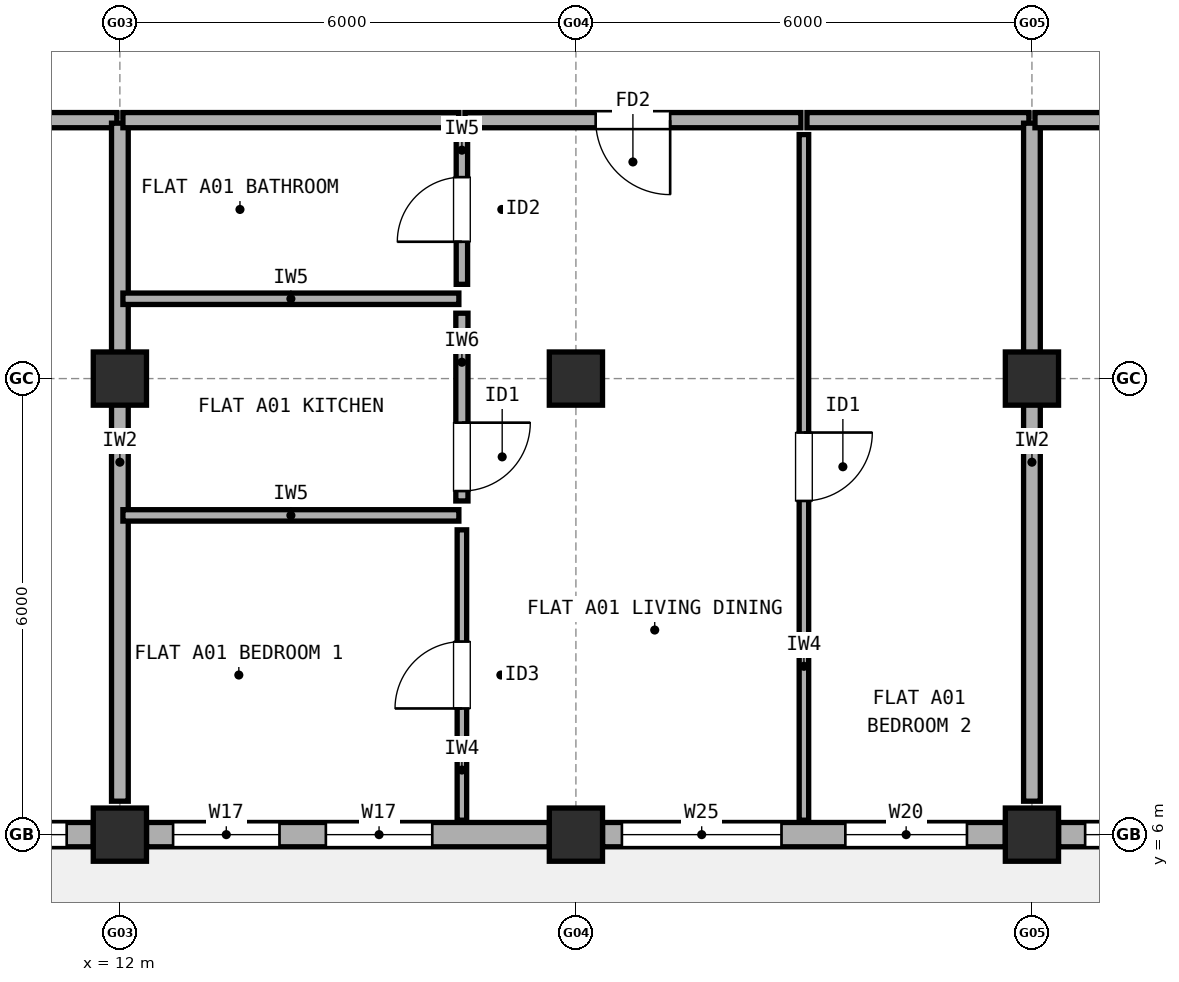
"""IFC4 building model, lengths in metres.
Left out: names, types, materials, properties, quantities, classifications, styles, units other than length and angle.
Written with IfcOpenShell. Run it as: python <this file> out.ifc"""

import sys

from ifc_helpers import new_model, si_unit, direction, frame, frame_2d, origin, origin_2d, place, context, subcontext, project, spatial, rectangle, extrude, element, fill, save


model = new_model("IFC4")
c1 = context("Model", 3, precision=1e-05, world=origin(), true_north=direction((0.0, 1.0)))
c2 = subcontext(c1, "Body", "Model", "MODEL_VIEW")
j1 = project(units=[si_unit("LENGTHUNIT", "METRE"), si_unit("PLANEANGLEUNIT", "RADIAN")], contexts=[c1])
p1 = place(None, origin())
s1 = spatial("IfcSite", under=j1, at=p1, CompositionType="ELEMENT")
p2 = place(p1, origin())
s2 = spatial("IfcBuilding", under=s1, at=p2, CompositionType="ELEMENT")
p3 = place(p2, origin())
s3 = spatial("IfcBuildingStorey", under=s2, at=p3, CompositionType="ELEMENT", Elevation=0.0)
for number, where, z_axis, x_axis in (
    (1, (12.0, 6.0, 0.0), (0.0, 0.0, 1.0), (1.0, 0.0, 0.0)),
    (2, (12.0, 12.0, 0.0), (0.0, 0.0, 1.0), (1.0, 0.0, 0.0)),
    (3, (18.0, 6.0, 0.0), (0.0, 0.0, 1.0), (1.0, 0.0, 0.0)),
    (4, (18.0, 12.0, 0.0), (0.0, 0.0, 1.0), (1.0, 0.0, 0.0)),
    (5, (24.0, 6.0, 0.0), (0.0, 0.0, 1.0), (1.0, 0.0, 0.0)),
    (6, (24.0, 12.0, 0.0), (0.0, 0.0, 1.0), (1.0, 0.0, 0.0)),
):
    element("IfcColumn", number, at=place(p3, frame(where, z_axis=z_axis, x_axis=x_axis)), inside=s3, PredefinedType="COLUMN", context=c2, shape_type="SweptSolid", body=[
        extrude(rectangle(XDim=0.7, YDim=0.7, at=origin_2d()), origin(), (0.0, 0.0, 1.0), 4.23),
    ])
p4 = place(p3, frame((6.35, 6.0, 0.0), z_axis=(0.0, 0.0, 1.0), x_axis=(1.0, 0.0, 0.0)))
e7 = element("IfcWall", 7, at=p4, inside=s3, PredefinedType="STANDARD", context=c2, shape_type="SweptSolid", body=[
    extrude(rectangle(XDim=5.3, YDim=0.32, at=frame_2d((2.65, 0.0))), origin(), (0.0, 0.0, 1.0), 3.112),
])
p5 = place(p4, frame((0.35, 0.0, 0.9)))
e8 = element("IfcOpeningElement", 8, at=p5, cuts=e7, PredefinedType="OPENING", context=c2, shape_type="SweptSolid", body=[
    extrude(rectangle(XDim=1.3, YDim=1.45, at=frame_2d((0.65, 0.725))), frame((0.0, 0.17, 0.0), z_axis=(0.0, -1.0, 0.0), x_axis=(1.0, 0.0, 0.0)), (0.0, 0.0, 1.0), 0.34),
])
p6 = place(p4, frame((3.65, 0.0, 0.9)))
e9 = element("IfcOpeningElement", 9, at=p6, cuts=e7, PredefinedType="OPENING", context=c2, shape_type="SweptSolid", body=[
    extrude(rectangle(XDim=1.3, YDim=1.45, at=frame_2d((0.65, 0.725))), frame((0.0, 0.17, 0.0), z_axis=(0.0, -1.0, 0.0), x_axis=(1.0, 0.0, 0.0)), (0.0, 0.0, 1.0), 0.34),
])
p7 = place(p3, frame((12.35, 6.0, 0.0), z_axis=(0.0, 0.0, 1.0), x_axis=(1.0, 0.0, 0.0)))
e10 = element("IfcWall", 10, at=p7, inside=s3, PredefinedType="STANDARD", context=c2, shape_type="SweptSolid", body=[
    extrude(rectangle(XDim=5.3, YDim=0.32, at=frame_2d((2.65, 0.0))), origin(), (0.0, 0.0, 1.0), 3.112),
])
p8 = place(p7, frame((0.35, 0.0, 0.9)))
e11 = element("IfcOpeningElement", 11, at=p8, cuts=e10, PredefinedType="OPENING", context=c2, shape_type="SweptSolid", body=[
    extrude(rectangle(XDim=1.4, YDim=1.5, at=frame_2d((0.7, 0.75))), frame((0.0, 0.17, 0.0), z_axis=(0.0, -1.0, 0.0), x_axis=(1.0, 0.0, 0.0)), (0.0, 0.0, 1.0), 0.34),
])
p9 = place(p7, frame((2.36, 0.0, 0.9)))
e12 = element("IfcOpeningElement", 12, at=p9, cuts=e10, PredefinedType="OPENING", context=c2, shape_type="SweptSolid", body=[
    extrude(rectangle(XDim=1.4, YDim=1.5, at=frame_2d((0.7, 0.75))), frame((0.0, 0.17, 0.0), z_axis=(0.0, -1.0, 0.0), x_axis=(1.0, 0.0, 0.0)), (0.0, 0.0, 1.0), 0.34),
])
p10 = place(p3, frame((18.35, 6.0, 0.0), z_axis=(0.0, 0.0, 1.0), x_axis=(1.0, 0.0, 0.0)))
e13 = element("IfcWall", 13, at=p10, inside=s3, PredefinedType="STANDARD", context=c2, shape_type="SweptSolid", body=[
    extrude(rectangle(XDim=5.3, YDim=0.32, at=frame_2d((2.65, 0.0))), origin(), (0.0, 0.0, 1.0), 3.112),
])
p11 = place(p10, frame((0.255, 0.0, 0.9)))
e14 = element("IfcOpeningElement", 14, at=p11, cuts=e13, PredefinedType="OPENING", context=c2, shape_type="SweptSolid", body=[
    extrude(rectangle(XDim=2.1, YDim=1.55, at=frame_2d((1.05, 0.775))), frame((0.0, 0.17, 0.0), z_axis=(0.0, -1.0, 0.0), x_axis=(1.0, 0.0, 0.0)), (0.0, 0.0, 1.0), 0.34),
])
p12 = place(p10, frame((3.195, 0.0, 0.9)))
e15 = element("IfcOpeningElement", 15, at=p12, cuts=e13, PredefinedType="OPENING", context=c2, shape_type="SweptSolid", body=[
    extrude(rectangle(XDim=1.6, YDim=1.5, at=frame_2d((0.8, 0.75))), frame((0.0, 0.17, 0.0), z_axis=(0.0, -1.0, 0.0), x_axis=(1.0, 0.0, 0.0)), (0.0, 0.0, 1.0), 0.34),
])
p13 = place(p3, frame((24.35, 6.0, 0.0), z_axis=(0.0, 0.0, 1.0), x_axis=(1.0, 0.0, 0.0)))
e16 = element("IfcWall", 16, at=p13, inside=s3, PredefinedType="STANDARD", context=c2, shape_type="SweptSolid", body=[
    extrude(rectangle(XDim=5.35, YDim=0.32, at=frame_2d((2.675, 0.0))), origin(), (0.0, 0.0, 1.0), 3.112),
])
p14 = place(p13, frame((0.35, 0.0, 0.9)))
e17 = element("IfcOpeningElement", 17, at=p14, cuts=e16, PredefinedType="OPENING", context=c2, shape_type="SweptSolid", body=[
    extrude(rectangle(XDim=1.3, YDim=1.45, at=frame_2d((0.65, 0.725))), frame((0.0, 0.17, 0.0), z_axis=(0.0, -1.0, 0.0), x_axis=(1.0, 0.0, 0.0)), (0.0, 0.0, 1.0), 0.34),
])
p15 = place(p13, frame((3.7, 0.0, 0.9)))
e18 = element("IfcOpeningElement", 18, at=p15, cuts=e16, PredefinedType="OPENING", context=c2, shape_type="SweptSolid", body=[
    extrude(rectangle(XDim=1.3, YDim=1.45, at=frame_2d((0.65, 0.725))), frame((0.0, 0.17, 0.0), z_axis=(0.0, -1.0, 0.0), x_axis=(1.0, 0.0, 0.0)), (0.0, 0.0, 1.0), 0.34),
])
p16 = place(p3, frame((0.44, 15.4, 0.0), z_axis=(0.0, 0.0, 1.0), x_axis=(1.0, 0.0, 0.0)))
e19 = element("IfcWall", 19, at=p16, inside=s3, PredefinedType="SOLIDWALL", context=c2, shape_type="SweptSolid", body=[
    extrude(rectangle(XDim=11.52, YDim=0.2, at=frame_2d((5.76, 0.0))), origin(), (0.0, 0.0, 1.0), 3.612),
])
p17 = place(p16, frame((5.11, 0.0, 0.0)))
e20 = element("IfcOpeningElement", 20, at=p17, cuts=e19, PredefinedType="OPENING", context=c2, shape_type="SweptSolid", body=[
    extrude(rectangle(XDim=1.3, YDim=2.15, at=frame_2d((0.65, 1.075))), frame((0.0, 0.11, 0.0), z_axis=(0.0, -1.0, 0.0), x_axis=(1.0, 0.0, 0.0)), (0.0, 0.0, 1.0), 0.22),
])
p18 = place(p3, frame((12.0, 6.44, 0.0), z_axis=(0.0, 0.0, 1.0), x_axis=(0.0, 1.0, 0.0)))
e21 = element("IfcWall", 21, at=p18, inside=s3, PredefinedType="SOLIDWALL", context=c2, shape_type="SweptSolid", body=[
    extrude(rectangle(XDim=8.92, YDim=0.22, at=frame_2d((4.46, 0.0))), origin(), (0.0, 0.0, 1.0), 3.612),
])
p19 = place(p3, frame((12.04, 15.4, 0.0), z_axis=(0.0, 0.0, 1.0), x_axis=(1.0, 0.0, 0.0)))
e22 = element("IfcWall", 22, at=p19, inside=s3, PredefinedType="SOLIDWALL", context=c2, shape_type="SweptSolid", body=[
    extrude(rectangle(XDim=4.42, YDim=0.2, at=frame_2d((2.21, 0.0))), origin(), (0.0, 0.0, 1.0), 3.612),
])
p20 = place(p3, frame((16.54, 15.4, 0.0), z_axis=(0.0, 0.0, 1.0), x_axis=(1.0, 0.0, 0.0)))
e23 = element("IfcWall", 23, at=p20, inside=s3, PredefinedType="SOLIDWALL", context=c2, shape_type="SweptSolid", body=[
    extrude(rectangle(XDim=4.42, YDim=0.2, at=frame_2d((2.21, 0.0))), origin(), (0.0, 0.0, 1.0), 3.612),
])
p21 = place(p20, frame((1.72, 0.0, 0.0)))
e24 = element("IfcOpeningElement", 24, at=p21, cuts=e23, PredefinedType="OPENING", context=c2, shape_type="SweptSolid", body=[
    extrude(rectangle(XDim=0.98, YDim=2.15, at=frame_2d((0.49, 1.075))), frame((0.0, 0.11, 0.0), z_axis=(0.0, -1.0, 0.0), x_axis=(1.0, 0.0, 0.0)), (0.0, 0.0, 1.0), 0.22),
])
p22 = place(p3, frame((16.5, 6.19, 0.0), z_axis=(0.0, 0.0, 1.0), x_axis=(0.0, 1.0, 0.0)))
e25 = element("IfcWall", 25, at=p22, inside=s3, PredefinedType="PARTITIONING", context=c2, shape_type="SweptSolid", body=[
    extrude(rectangle(XDim=3.82, YDim=0.125, at=frame_2d((1.91, 0.0))), origin(), (0.0, 0.0, 1.0), 3.112),
])
p23 = place(p22, frame((1.47, 0.0, 0.0)))
e26 = element("IfcOpeningElement", 26, at=p23, cuts=e25, PredefinedType="OPENING", context=c2, shape_type="SweptSolid", body=[
    extrude(rectangle(XDim=0.88, YDim=2.1, at=frame_2d((0.44, 1.05))), frame((0.0, 0.073, 0.0), z_axis=(0.0, -1.0, 0.0), x_axis=(1.0, 0.0, 0.0)), (0.0, 0.0, 1.0), 0.145),
])
p24 = place(p3, frame((16.5, 10.39, 0.0), z_axis=(0.0, 0.0, 1.0), x_axis=(0.0, 1.0, 0.0)))
e27 = element("IfcWall", 27, at=p24, inside=s3, PredefinedType="PLUMBINGWALL", context=c2, shape_type="SweptSolid", body=[
    extrude(rectangle(XDim=2.47, YDim=0.16, at=frame_2d((1.235, 0.0))), origin(), (0.0, 0.0, 1.0), 3.562),
])
p25 = place(p24, frame((0.13, 0.0, 0.0)))
e28 = element("IfcOpeningElement", 28, at=p25, cuts=e27, PredefinedType="OPENING", context=c2, shape_type="SweptSolid", body=[
    extrude(rectangle(XDim=0.9, YDim=2.1, at=frame_2d((0.45, 1.05))), frame((0.0, 0.09, 0.0), z_axis=(0.0, -1.0, 0.0), x_axis=(1.0, 0.0, 0.0)), (0.0, 0.0, 1.0), 0.18),
])
p26 = place(p3, frame((16.5, 13.24, 0.0), z_axis=(0.0, 0.0, 1.0), x_axis=(0.0, 1.0, 0.0)))
e29 = element("IfcWall", 29, at=p26, inside=s3, PredefinedType="PARTITIONING", context=c2, shape_type="SweptSolid", body=[
    extrude(rectangle(XDim=1.97, YDim=0.15, at=frame_2d((0.985, 0.0))), origin(), (0.0, 0.0, 1.0), 4.23),
])
p27 = place(p26, frame((0.56, 0.0, 0.0)))
e30 = element("IfcOpeningElement", 30, at=p27, cuts=e29, PredefinedType="OPENING", context=c2, shape_type="SweptSolid", body=[
    extrude(rectangle(XDim=0.85, YDim=2.1, at=frame_2d((0.425, 1.05))), frame((0.0, 0.085, 0.0), z_axis=(0.0, -1.0, 0.0), x_axis=(1.0, 0.0, 0.0)), (0.0, 0.0, 1.0), 0.17),
])
for number, where, z_axis, x_axis in (
    (31, (12.04, 10.2, 0.0), (0.0, 0.0, 1.0), (1.0, 0.0, 0.0)),
    (32, (12.04, 13.05, 0.0), (0.0, 0.0, 1.0), (1.0, 0.0, 0.0)),
):
    element("IfcWall", number, at=place(p3, frame(where, z_axis=z_axis, x_axis=x_axis)), inside=s3, PredefinedType="PARTITIONING", context=c2, shape_type="SweptSolid", body=[
        extrude(rectangle(XDim=4.42, YDim=0.15, at=frame_2d((2.21, 0.0))), origin(), (0.0, 0.0, 1.0), 3.612),
    ])
p28 = place(p3, frame((21.04, 15.4, 0.0), z_axis=(0.0, 0.0, 1.0), x_axis=(1.0, 0.0, 0.0)))
e33 = element("IfcWall", 33, at=p28, inside=s3, PredefinedType="SOLIDWALL", context=c2, shape_type="SweptSolid", body=[
    extrude(rectangle(XDim=2.92, YDim=0.2, at=frame_2d((1.46, 0.0))), origin(), (0.0, 0.0, 1.0), 3.612),
])
p29 = place(p3, frame((21.0, 6.19, 0.0), z_axis=(0.0, 0.0, 1.0), x_axis=(0.0, 1.0, 0.0)))
e34 = element("IfcWall", 34, at=p29, inside=s3, PredefinedType="PARTITIONING", context=c2, shape_type="SweptSolid", body=[
    extrude(rectangle(XDim=9.02, YDim=0.125, at=frame_2d((4.51, 0.0))), origin(), (0.0, 0.0, 1.0), 3.112),
])
p30 = place(p29, frame((4.2, 0.0, 0.0)))
e35 = element("IfcOpeningElement", 35, at=p30, cuts=e34, PredefinedType="OPENING", context=c2, shape_type="SweptSolid", body=[
    extrude(rectangle(XDim=0.9, YDim=2.1, at=frame_2d((0.45, 1.05))), frame((0.0, 0.073, 0.0), z_axis=(0.0, -1.0, 0.0), x_axis=(1.0, 0.0, 0.0)), (0.0, 0.0, 1.0), 0.145),
])
p31 = place(p3, frame((24.0, 6.44, 0.0), z_axis=(0.0, 0.0, 1.0), x_axis=(0.0, 1.0, 0.0)))
e36 = element("IfcWall", 36, at=p31, inside=s3, PredefinedType="SOLIDWALL", context=c2, shape_type="SweptSolid", body=[
    extrude(rectangle(XDim=8.92, YDim=0.22, at=frame_2d((4.46, 0.0))), origin(), (0.0, 0.0, 1.0), 3.612),
])
p32 = place(p3, frame((24.04, 15.4, 0.0), z_axis=(0.0, 0.0, 1.0), x_axis=(1.0, 0.0, 0.0)))
e37 = element("IfcWall", 37, at=p32, inside=s3, PredefinedType="SOLIDWALL", context=c2, shape_type="SweptSolid", body=[
    extrude(rectangle(XDim=11.52, YDim=0.2, at=frame_2d((5.76, 0.0))), origin(), (0.0, 0.0, 1.0), 3.612),
])
p33 = place(p32, frame((5.11, 0.0, 0.0)))
e38 = element("IfcOpeningElement", 38, at=p33, cuts=e37, PredefinedType="OPENING", context=c2, shape_type="SweptSolid", body=[
    extrude(rectangle(XDim=1.3, YDim=2.15, at=frame_2d((0.65, 1.075))), frame((0.0, 0.11, 0.0), z_axis=(0.0, -1.0, 0.0), x_axis=(1.0, 0.0, 0.0)), (0.0, 0.0, 1.0), 0.22),
])
p34 = place(p6, origin())
e39 = element("IfcWindow", 39, at=p34, inside=s3, PartitioningType="SINGLE_PANEL", PredefinedType="WINDOW", context=c2, shape_type="SweptSolid", body=[
    extrude(rectangle(XDim=1.3, YDim=1.45, at=frame_2d((0.65, 0.725))), frame((0.0, 0.03, 0.0), z_axis=(0.0, -1.0, 0.0), x_axis=(1.0, 0.0, 0.0)), (0.0, 0.0, 1.0), 0.06),
])
fill(e9, e39)
p35 = place(p8, origin())
e40 = element("IfcWindow", 40, at=p35, inside=s3, PartitioningType="SINGLE_PANEL", PredefinedType="WINDOW", context=c2, shape_type="SweptSolid", body=[
    extrude(rectangle(XDim=1.4, YDim=1.5, at=frame_2d((0.7, 0.75))), frame((0.0, 0.03, 0.0), z_axis=(0.0, -1.0, 0.0), x_axis=(1.0, 0.0, 0.0)), (0.0, 0.0, 1.0), 0.06),
])
fill(e11, e40)
p36 = place(p9, origin())
e41 = element("IfcWindow", 41, at=p36, inside=s3, PartitioningType="SINGLE_PANEL", PredefinedType="WINDOW", context=c2, shape_type="SweptSolid", body=[
    extrude(rectangle(XDim=1.4, YDim=1.5, at=frame_2d((0.7, 0.75))), frame((0.0, 0.03, 0.0), z_axis=(0.0, -1.0, 0.0), x_axis=(1.0, 0.0, 0.0)), (0.0, 0.0, 1.0), 0.06),
])
fill(e12, e41)
p37 = place(p11, origin())
e42 = element("IfcWindow", 42, at=p37, inside=s3, PartitioningType="SINGLE_PANEL", PredefinedType="WINDOW", context=c2, shape_type="SweptSolid", body=[
    extrude(rectangle(XDim=2.1, YDim=1.55, at=frame_2d((1.05, 0.775))), frame((0.0, 0.03, 0.0), z_axis=(0.0, -1.0, 0.0), x_axis=(1.0, 0.0, 0.0)), (0.0, 0.0, 1.0), 0.06),
])
fill(e14, e42)
p38 = place(p12, origin())
e43 = element("IfcWindow", 43, at=p38, inside=s3, PartitioningType="SINGLE_PANEL", PredefinedType="WINDOW", context=c2, shape_type="SweptSolid", body=[
    extrude(rectangle(XDim=1.6, YDim=1.5, at=frame_2d((0.8, 0.75))), frame((0.0, 0.03, 0.0), z_axis=(0.0, -1.0, 0.0), x_axis=(1.0, 0.0, 0.0)), (0.0, 0.0, 1.0), 0.06),
])
fill(e15, e43)
p39 = place(p14, origin())
e44 = element("IfcWindow", 44, at=p39, inside=s3, PartitioningType="SINGLE_PANEL", PredefinedType="WINDOW", context=c2, shape_type="SweptSolid", body=[
    extrude(rectangle(XDim=1.3, YDim=1.45, at=frame_2d((0.65, 0.725))), frame((0.0, 0.03, 0.0), z_axis=(0.0, -1.0, 0.0), x_axis=(1.0, 0.0, 0.0)), (0.0, 0.0, 1.0), 0.06),
])
fill(e17, e44)
p40 = place(p21, origin())
e45 = element("IfcDoor", 45, at=p40, inside=s3, OperationType="SINGLE_SWING_RIGHT", PredefinedType="DOOR", context=c2, shape_type="SweptSolid", body=[
    extrude(rectangle(XDim=0.98, YDim=2.15, at=frame_2d((0.49, 1.075))), frame((0.0, 0.025, 0.0), z_axis=(0.0, -1.0, 0.0), x_axis=(1.0, 0.0, 0.0)), (0.0, 0.0, 1.0), 0.05),
])
fill(e24, e45)
p41 = place(p23, origin())
e46 = element("IfcDoor", 46, at=p41, inside=s3, OperationType="SINGLE_SWING_LEFT", PredefinedType="DOOR", context=c2, shape_type="SweptSolid", body=[
    extrude(rectangle(XDim=0.88, YDim=2.1, at=frame_2d((0.44, 1.05))), frame((0.0, 0.025, 0.0), z_axis=(0.0, -1.0, 0.0), x_axis=(1.0, 0.0, 0.0)), (0.0, 0.0, 1.0), 0.05),
])
fill(e26, e46)
p42 = place(p25, origin())
e47 = element("IfcDoor", 47, at=p42, inside=s3, OperationType="SINGLE_SWING_RIGHT", PredefinedType="DOOR", context=c2, shape_type="SweptSolid", body=[
    extrude(rectangle(XDim=0.9, YDim=2.1, at=frame_2d((0.45, 1.05))), frame((0.0, 0.025, 0.0), z_axis=(0.0, -1.0, 0.0), x_axis=(1.0, 0.0, 0.0)), (0.0, 0.0, 1.0), 0.05),
])
fill(e28, e47)
p43 = place(p27, origin())
e48 = element("IfcDoor", 48, at=p43, inside=s3, OperationType="SINGLE_SWING_LEFT", PredefinedType="DOOR", context=c2, shape_type="SweptSolid", body=[
    extrude(rectangle(XDim=0.85, YDim=2.1, at=frame_2d((0.425, 1.05))), frame((0.0, 0.025, 0.0), z_axis=(0.0, -1.0, 0.0), x_axis=(1.0, 0.0, 0.0)), (0.0, 0.0, 1.0), 0.05),
])
fill(e30, e48)
p44 = place(p30, origin())
e49 = element("IfcDoor", 49, at=p44, inside=s3, OperationType="SINGLE_SWING_RIGHT", PredefinedType="DOOR", context=c2, shape_type="SweptSolid", body=[
    extrude(rectangle(XDim=0.9, YDim=2.1, at=frame_2d((0.45, 1.05))), frame((0.0, 0.025, 0.0), z_axis=(0.0, -1.0, 0.0), x_axis=(1.0, 0.0, 0.0)), (0.0, 0.0, 1.0), 0.05),
])
fill(e35, e49)
save(model, sys.argv[1])
